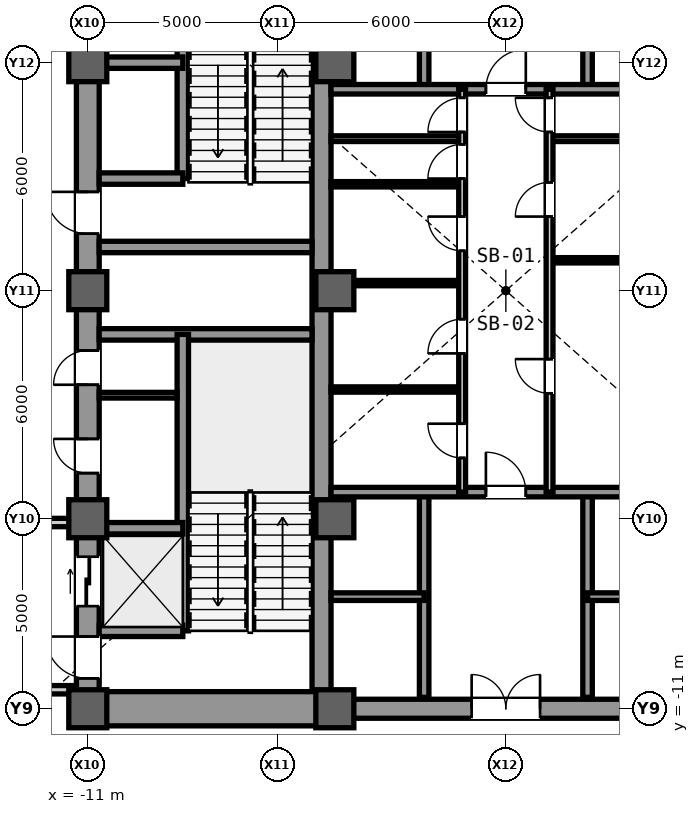
"""IFC4 building model, lengths in metres.
Left out: names, types, materials, properties, quantities, classifications, styles, units other than length and angle.
Written with IfcOpenShell. Run it as: python <this file> out.ifc"""

import sys

from ifc_helpers import new_model, si_unit, direction, frame, frame_2d, origin, origin_2d, place, context, subcontext, project, spatial, rectangle, extrude, source, transform, mapped, element, fill, save


model = new_model("IFC4")
c1 = context("Model", 3, precision=1e-05, world=origin(), true_north=direction((0.0, 1.0)))
c2 = subcontext(c1, "Body", "Model", "MODEL_VIEW")
j1 = project(units=[si_unit("LENGTHUNIT", "METRE"), si_unit("PLANEANGLEUNIT", "RADIAN")], contexts=[c1])
p1 = place(None, origin())
s1 = spatial("IfcSite", under=j1, at=p1, CompositionType="ELEMENT")
p2 = place(p1, origin())
s2 = spatial("IfcBuilding", under=s1, at=p2, CompositionType="ELEMENT")
p3 = place(p2, frame((0.0, 0.0, -9.6)))
s3 = spatial("IfcBuildingStorey", under=s2, at=p3, CompositionType="ELEMENT", Elevation=-9.6)
m1 = source(origin(), c2, "Body", "SweptSolid", [
    extrude(rectangle(XDim=22.0, YDim=0.6, at=frame_2d((11.0, 0.0))), origin(), (0.0, 0.0, 1.0), 4.48),
])
p4 = place(p3, frame((-11.0, -11.0, 0.0), z_axis=(0.0, 0.0, 1.0), x_axis=(0.0, 1.0, 0.0)))
e1 = element("IfcWall", 1, at=p4, inside=s3, PredefinedType="SHEAR", context=c2, shape_type="MappedRepresentation", body=[
    mapped(m1, transform((0.0, 0.0, 0.0), scale=1.0)),
])
m2 = source(origin(), c2, "Body", "SweptSolid", [
    extrude(rectangle(XDim=1.1, YDim=2.2, at=frame_2d((0.55, 1.1))), frame((0.0, 0.31, 0.0), z_axis=(0.0, -1.0, 0.0), x_axis=(1.0, 0.0, 0.0)), (0.0, 0.0, 1.0), 0.62),
])
p5 = place(p4, frame((0.8, 0.0, 0.0)))
e2 = element("IfcOpeningElement", 2, at=p5, cuts=e1, PredefinedType="OPENING", context=c2, shape_type="MappedRepresentation", body=[
    mapped(m2, transform((0.0, 0.0, 0.0), scale=1.0)),
])
p6 = place(p4, frame((12.5, 0.0, 0.0)))
e3 = element("IfcOpeningElement", 3, at=p6, cuts=e1, PredefinedType="OPENING", context=c2, shape_type="MappedRepresentation", body=[
    mapped(m2, transform((0.0, 0.0, 0.0), scale=1.0)),
])
m3 = source(origin(), c2, "Body", "SweptSolid", [
    extrude(rectangle(XDim=0.9, YDim=2.15, at=frame_2d((0.45, 1.075))), frame((0.0, 0.31, 0.0), z_axis=(0.0, -1.0, 0.0), x_axis=(1.0, 0.0, 0.0)), (0.0, 0.0, 1.0), 0.62),
])
p7 = place(p4, frame((6.2, 0.0, 0.0)))
e4 = element("IfcOpeningElement", 4, at=p7, cuts=e1, PredefinedType="OPENING", context=c2, shape_type="MappedRepresentation", body=[
    mapped(m3, transform((0.0, 0.0, 0.0), scale=1.0)),
])
p8 = place(p4, frame((8.525, 0.0, 0.0)))
e5 = element("IfcOpeningElement", 5, at=p8, cuts=e1, PredefinedType="OPENING", context=c2, shape_type="MappedRepresentation", body=[
    mapped(m3, transform((0.0, 0.0, 0.0), scale=1.0)),
])
m4 = source(origin(), c2, "Body", "SweptSolid", [
    extrude(rectangle(XDim=1.3, YDim=2.3, at=frame_2d((0.65, 1.15))), frame((0.0, 0.31, 0.0), z_axis=(0.0, -1.0, 0.0), x_axis=(1.0, 0.0, 0.0)), (0.0, 0.0, 1.0), 0.62),
])
p9 = place(p4, frame((2.7, 0.0, 0.0)))
e6 = element("IfcOpeningElement", 6, at=p9, cuts=e1, PredefinedType="OPENING", context=c2, shape_type="MappedRepresentation", body=[
    mapped(m4, transform((0.0, 0.0, 0.0), scale=1.0)),
])
m5 = source(origin(), c2, "Body", "SweptSolid", [
    extrude(rectangle(XDim=21.4, YDim=0.5, at=frame_2d((10.7, 0.0))), origin(), (0.0, 0.0, 1.0), 4.48),
])
p10 = place(p3, frame((-4.85, -10.7, 0.0), z_axis=(0.0, 0.0, 1.0), x_axis=(0.0, 1.0, 0.0)))
e7 = element("IfcWall", 7, at=p10, inside=s3, PredefinedType="SHEAR", context=c2, shape_type="MappedRepresentation", body=[
    mapped(m5, transform((0.0, 0.0, 0.0), scale=1.0)),
])
m6 = source(origin(), c2, "Body", "SweptSolid", [
    extrude(rectangle(XDim=5.85, YDim=0.9, at=frame_2d((2.925, 0.0))), origin(), (0.0, 0.0, 1.0), 4.48),
])
p11 = place(p3, frame((-10.7, -11.0, 0.0), z_axis=(0.0, 0.0, 1.0), x_axis=(1.0, 0.0, 0.0)))
e8 = element("IfcWall", 8, at=p11, inside=s3, PredefinedType="SHEAR", context=c2, shape_type="MappedRepresentation", body=[
    mapped(m6, transform((0.0, 0.0, 0.0), scale=1.0)),
])
m7 = source(origin(), c2, "Body", "SweptSolid", [
    extrude(rectangle(XDim=5.6, YDim=0.3, at=frame_2d((2.8, 0.0))), origin(), (0.0, 0.0, 1.0), 4.48),
])
for number, where, z_axis, x_axis in (
    (9, (-10.7, -1.15, 0.0), (0.0, 0.0, 1.0), (1.0, 0.0, 0.0)),
    (10, (-10.7, 1.15, 0.0), (0.0, 0.0, 1.0), (1.0, 0.0, 0.0)),
):
    element("IfcWall", number, at=place(p3, frame(where, z_axis=z_axis, x_axis=x_axis)), inside=s3, PredefinedType="SHEAR", context=c2, shape_type="MappedRepresentation", body=[
        mapped(m7, transform((0.0, 0.0, 0.0), scale=1.0)),
    ])
m8 = source(origin(), c2, "Body", "SweptSolid", [
    extrude(rectangle(XDim=9.2, YDim=0.5, at=frame_2d((4.6, 0.0))), origin(), (0.0, 0.0, 1.0), 4.48),
])
p12 = place(p3, frame((-4.6, -11.0, 0.0), z_axis=(0.0, 0.0, 1.0), x_axis=(1.0, 0.0, 0.0)))
e11 = element("IfcWall", 11, at=p12, inside=s3, PredefinedType="SHEAR", context=c2, shape_type="MappedRepresentation", body=[
    mapped(m8, transform((0.0, 0.0, 0.0), scale=1.0)),
])
m9 = source(origin(), c2, "Body", "SweptSolid", [
    extrude(rectangle(XDim=1.8, YDim=2.25, at=frame_2d((0.9, 1.125))), frame((0.0, 0.26, 0.0), z_axis=(0.0, -1.0, 0.0), x_axis=(1.0, 0.0, 0.0)), (0.0, 0.0, 1.0), 0.52),
])
p13 = place(p12, frame((3.7, 0.0, 0.0)))
e12 = element("IfcOpeningElement", 12, at=p13, cuts=e11, PredefinedType="OPENING", context=c2, shape_type="MappedRepresentation", body=[
    mapped(m9, transform((0.0, 0.0, 0.0), scale=1.0)),
])
m10 = source(origin(), c2, "Body", "SweptSolid", [
    extrude(rectangle(XDim=1.0, YDim=1.0, at=origin_2d()), origin(), (0.0, 0.0, 1.0), 4.8),
])
for number, where, z_axis, x_axis in (
    (13, (-11.0, -11.0, 0.0), (0.0, 0.0, 1.0), (1.0, 0.0, 0.0)),
    (14, (-11.0, -6.0, 0.0), (0.0, 0.0, 1.0), (1.0, 0.0, 0.0)),
    (15, (-11.0, 0.0, 0.0), (0.0, 0.0, 1.0), (1.0, 0.0, 0.0)),
    (16, (-11.0, 6.0, 0.0), (0.0, 0.0, 1.0), (1.0, 0.0, 0.0)),
    (17, (-4.5, -11.0, 0.0), (0.0, 0.0, 1.0), (1.0, 0.0, 0.0)),
    (18, (-4.5, -6.0, 0.0), (0.0, 0.0, 1.0), (1.0, 0.0, 0.0)),
    (19, (-4.5, 0.0, 0.0), (0.0, 0.0, 1.0), (1.0, 0.0, 0.0)),
    (20, (-4.5, 6.0, 0.0), (0.0, 0.0, 1.0), (1.0, 0.0, 0.0)),
):
    element("IfcColumn", number, at=place(p3, frame(where, z_axis=z_axis, x_axis=x_axis)), inside=s3, PredefinedType="COLUMN", context=c2, shape_type="MappedRepresentation", body=[
        mapped(m10, transform((0.0, 0.0, 0.0), scale=1.0)),
    ])
m11 = source(origin(), c2, "Body", "SweptSolid", [
    extrude(rectangle(XDim=7.8, YDim=0.3, at=frame_2d((3.9, 0.0))), origin(), (0.0, 0.0, 1.0), 4.48),
])
p14 = place(p3, frame((-8.5, -8.95, 0.0), z_axis=(0.0, 0.0, 1.0), x_axis=(0.0, 1.0, 0.0)))
e21 = element("IfcWall", 21, at=p14, inside=s3, PredefinedType="SHEAR", context=c2, shape_type="MappedRepresentation", body=[
    mapped(m11, transform((0.0, 0.0, 0.0), scale=1.0)),
])
m12 = source(origin(), c2, "Body", "SweptSolid", [
    extrude(rectangle(XDim=2.2, YDim=0.3, at=frame_2d((1.1, 0.0))), origin(), (0.0, 0.0, 1.0), 4.48),
])
for number, where, z_axis, x_axis in (
    (22, (-10.7, -8.95, 0.0), (0.0, 0.0, 1.0), (1.0, 0.0, 0.0)),
    (23, (-10.7, -6.25, 0.0), (0.0, 0.0, 1.0), (1.0, 0.0, 0.0)),
):
    element("IfcWall", number, at=place(p3, frame(where, z_axis=z_axis, x_axis=x_axis)), inside=s3, PredefinedType="SHEAR", context=c2, shape_type="MappedRepresentation", body=[
        mapped(m12, transform((0.0, 0.0, 0.0), scale=1.0)),
    ])
m13 = source(origin(), c2, "Body", "SweptSolid", [
    extrude(rectangle(XDim=7.75, YDim=0.3, at=frame_2d((3.875, 0.0))), origin(), (0.0, 0.0, 1.0), 4.48),
])
p15 = place(p3, frame((-8.5, 2.95, 0.0), z_axis=(0.0, 0.0, 1.0), x_axis=(0.0, 1.0, 0.0)))
e24 = element("IfcWall", 24, at=p15, inside=s3, PredefinedType="SHEAR", context=c2, shape_type="MappedRepresentation", body=[
    mapped(m13, transform((0.0, 0.0, 0.0), scale=1.0)),
])
for number, where, z_axis, x_axis in (
    (25, (-10.7, 2.95, 0.0), (0.0, 0.0, 1.0), (1.0, 0.0, 0.0)),
    (26, (-10.7, 6.0, 0.0), (0.0, 0.0, 1.0), (1.0, 0.0, 0.0)),
):
    element("IfcWall", number, at=place(p3, frame(where, z_axis=z_axis, x_axis=x_axis)), inside=s3, PredefinedType="SHEAR", context=c2, shape_type="MappedRepresentation", body=[
        mapped(m12, transform((0.0, 0.0, 0.0), scale=1.0)),
    ])
m14 = source(origin(), c2, "Body", "SweptSolid", [
    extrude(rectangle(XDim=2.05, YDim=0.15, at=frame_2d((1.025, 0.0))), origin(), (0.0, 0.0, 1.0), 4.48),
])
p16 = place(p3, frame((-10.7, -2.75, 0.0), z_axis=(0.0, 0.0, 1.0), x_axis=(1.0, 0.0, 0.0)))
e27 = element("IfcWall", 27, at=p16, inside=s3, PredefinedType="PARTITIONING", context=c2, shape_type="MappedRepresentation", body=[
    mapped(m14, transform((0.0, 0.0, 0.0), scale=1.0)),
])
m15 = source(origin(), c2, "Body", "SweptSolid", [
    extrude(rectangle(XDim=4.05, YDim=0.22, at=frame_2d((2.025, 0.0))), origin(), (0.0, 0.0, 1.0), 4.48),
])
for number, where, z_axis, x_axis in (
    (28, (-15.35, -10.5, 0.0), (0.0, 0.0, 1.0), (1.0, 0.0, 0.0)),
    (29, (-15.35, -6.1, 0.0), (0.0, 0.0, 1.0), (1.0, 0.0, 0.0)),
):
    element("IfcWall", number, at=place(p3, frame(where, z_axis=z_axis, x_axis=x_axis)), inside=s3, PredefinedType="PARTITIONING", context=c2, shape_type="MappedRepresentation", body=[
        mapped(m15, transform((0.0, 0.0, 0.0), scale=1.0)),
    ])
m16 = source(origin(), c2, "Body", "SweptSolid", [
    extrude(rectangle(XDim=3.45, YDim=0.15, at=frame_2d((1.725, 0.0))), origin(), (0.0, 0.0, 1.0), 4.48),
])
for number, where, z_axis, x_axis in (
    (30, (-4.6, 4.0, 0.0), (0.0, 0.0, 1.0), (1.0, 0.0, 0.0)),
    (31, (1.15, 4.0, 0.0), (0.0, 0.0, 1.0), (1.0, 0.0, 0.0)),
):
    element("IfcWall", number, at=place(p3, frame(where, z_axis=z_axis, x_axis=x_axis)), inside=s3, PredefinedType="PARTITIONING", context=c2, shape_type="MappedRepresentation", body=[
        mapped(m16, transform((0.0, 0.0, 0.0), scale=1.0)),
    ])
m17 = source(origin(), c2, "Body", "SweptSolid", [
    extrude(rectangle(XDim=5.4, YDim=0.25, at=frame_2d((2.7, 0.0))), origin(), (0.0, 0.0, 1.0), 4.48),
])
for number, where, z_axis, x_axis in (
    (32, (-2.15, -10.7, 0.0), (0.0, 0.0, 1.0), (0.0, 1.0, 0.0)),
    (33, (2.15, -10.7, 0.0), (0.0, 0.0, 1.0), (0.0, 1.0, 0.0)),
):
    element("IfcWall", number, at=place(p3, frame(where, z_axis=z_axis, x_axis=x_axis)), inside=s3, PredefinedType="SHEAR", context=c2, shape_type="MappedRepresentation", body=[
        mapped(m17, transform((0.0, 0.0, 0.0), scale=1.0)),
    ])
m18 = source(origin(), c2, "Body", "SweptSolid", [
    extrude(rectangle(XDim=2.45, YDim=0.2, at=frame_2d((1.225, 0.0))), origin(), (0.0, 0.0, 1.0), 4.48),
])
for number, where, z_axis, x_axis in (
    (34, (-4.6, -8.05, 0.0), (0.0, 0.0, 1.0), (1.0, 0.0, 0.0)),
    (35, (2.15, -8.05, 0.0), (0.0, 0.0, 1.0), (1.0, 0.0, 0.0)),
):
    element("IfcWall", number, at=place(p3, frame(where, z_axis=z_axis, x_axis=x_axis)), inside=s3, PredefinedType="SHEAR", context=c2, shape_type="MappedRepresentation", body=[
        mapped(m18, transform((0.0, 0.0, 0.0), scale=1.0)),
    ])
m19 = source(origin(), c2, "Body", "SweptSolid", [
    extrude(rectangle(XDim=9.2, YDim=0.25, at=frame_2d((4.6, 0.0))), origin(), (0.0, 0.0, 1.0), 4.48),
])
p17 = place(p3, frame((-4.6, -5.3, 0.0), z_axis=(0.0, 0.0, 1.0), x_axis=(1.0, 0.0, 0.0)))
e36 = element("IfcWall", 36, at=p17, inside=s3, PredefinedType="SHEAR", context=c2, shape_type="MappedRepresentation", body=[
    mapped(m19, transform((0.0, 0.0, 0.0), scale=1.0)),
])
m20 = source(origin(), c2, "Body", "SweptSolid", [
    extrude(rectangle(XDim=1.05, YDim=2.2, at=frame_2d((0.525, 1.1))), frame((0.0, 0.135, 0.0), z_axis=(0.0, -1.0, 0.0), x_axis=(1.0, 0.0, 0.0)), (0.0, 0.0, 1.0), 0.27),
])
p18 = place(p17, frame((4.075, 0.0, 0.0)))
e37 = element("IfcOpeningElement", 37, at=p18, cuts=e36, PredefinedType="OPENING", context=c2, shape_type="MappedRepresentation", body=[
    mapped(m20, transform((0.0, 0.0, 0.0), scale=1.0)),
])
for number, where, z_axis, x_axis in (
    (38, (-2.15, 5.3, 0.0), (0.0, 0.0, 1.0), (0.0, 1.0, 0.0)),
    (39, (2.15, 5.3, 0.0), (0.0, 0.0, 1.0), (0.0, 1.0, 0.0)),
):
    element("IfcWall", number, at=place(p3, frame(where, z_axis=z_axis, x_axis=x_axis)), inside=s3, PredefinedType="SHEAR", context=c2, shape_type="MappedRepresentation", body=[
        mapped(m17, transform((0.0, 0.0, 0.0), scale=1.0)),
    ])
p19 = place(p3, frame((-4.6, 5.3, 0.0), z_axis=(0.0, 0.0, 1.0), x_axis=(1.0, 0.0, 0.0)))
e40 = element("IfcWall", 40, at=p19, inside=s3, PredefinedType="SHEAR", context=c2, shape_type="MappedRepresentation", body=[
    mapped(m19, transform((0.0, 0.0, 0.0), scale=1.0)),
])
p20 = place(p19, frame((4.075, 0.0, 0.0)))
e41 = element("IfcOpeningElement", 41, at=p20, cuts=e40, PredefinedType="OPENING", context=c2, shape_type="MappedRepresentation", body=[
    mapped(m20, transform((0.0, 0.0, 0.0), scale=1.0)),
])
m21 = source(origin(), c2, "Body", "SweptSolid", [
    extrude(rectangle(XDim=3.45, YDim=0.14, at=frame_2d((1.725, 0.0))), origin(), (0.0, 0.0, 1.0), 4.48),
])
p21 = place(p3, frame((-4.6, -2.6, 0.0), z_axis=(0.0, 0.0, 1.0), x_axis=(1.0, 0.0, 0.0)))
e42 = element("IfcWall", 42, at=p21, inside=s3, PredefinedType="PARTITIONING", context=c2, shape_type="MappedRepresentation", body=[
    mapped(m21, transform((0.0, 0.0, 0.0), scale=1.0)),
])
m22 = source(origin(), c2, "Body", "SweptSolid", [
    extrude(rectangle(XDim=3.45, YDim=0.14, at=frame_2d((1.725, 0.0))), origin(), (0.0, 0.0, 1.0), 3.785),
])
p22 = place(p3, frame((-4.6, 0.2, 0.0), z_axis=(0.0, 0.0, 1.0), x_axis=(1.0, 0.0, 0.0)))
e43 = element("IfcWall", 43, at=p22, inside=s3, PredefinedType="PARTITIONING", context=c2, shape_type="MappedRepresentation", body=[
    mapped(m22, transform((0.0, 0.0, 0.0), scale=1.0)),
])
p23 = place(p3, frame((-4.6, 2.8, 0.0), z_axis=(0.0, 0.0, 1.0), x_axis=(1.0, 0.0, 0.0)))
e44 = element("IfcWall", 44, at=p23, inside=s3, PredefinedType="PARTITIONING", context=c2, shape_type="MappedRepresentation", body=[
    mapped(m21, transform((0.0, 0.0, 0.0), scale=1.0)),
])
m23 = source(origin(), c2, "Body", "SweptSolid", [
    extrude(rectangle(XDim=10.6, YDim=0.18, at=frame_2d((5.3, 0.0))), origin(), (0.0, 0.0, 1.0), 4.48),
])
p24 = place(p3, frame((-1.15, -5.3, 0.0), z_axis=(0.0, 0.0, 1.0), x_axis=(0.0, 1.0, 0.0)))
e45 = element("IfcWall", 45, at=p24, inside=s3, PredefinedType="PARTITIONING", context=c2, shape_type="MappedRepresentation", body=[
    mapped(m23, transform((0.0, 0.0, 0.0), scale=1.0)),
])
m24 = source(origin(), c2, "Body", "SweptSolid", [
    extrude(rectangle(XDim=0.9, YDim=2.15, at=frame_2d((0.45, 1.075))), frame((0.0, 0.1, 0.0), z_axis=(0.0, -1.0, 0.0), x_axis=(1.0, 0.0, 0.0)), (0.0, 0.0, 1.0), 0.2),
])
p25 = place(p24, frame((0.9, 0.0, 0.0)))
e46 = element("IfcOpeningElement", 46, at=p25, cuts=e45, PredefinedType="OPENING", context=c2, shape_type="MappedRepresentation", body=[
    mapped(m24, transform((0.0, 0.0, 0.0), scale=1.0)),
])
p26 = place(p24, frame((3.65, 0.0, 0.0)))
e47 = element("IfcOpeningElement", 47, at=p26, cuts=e45, PredefinedType="OPENING", context=c2, shape_type="MappedRepresentation", body=[
    mapped(m24, transform((0.0, 0.0, 0.0), scale=1.0)),
])
p27 = place(p24, frame((6.35, 0.0, 0.0)))
e48 = element("IfcOpeningElement", 48, at=p27, cuts=e45, PredefinedType="OPENING", context=c2, shape_type="MappedRepresentation", body=[
    mapped(m24, transform((0.0, 0.0, 0.0), scale=1.0)),
])
p28 = place(p24, frame((8.25, 0.0, 0.0)))
e49 = element("IfcOpeningElement", 49, at=p28, cuts=e45, PredefinedType="OPENING", context=c2, shape_type="MappedRepresentation", body=[
    mapped(m24, transform((0.0, 0.0, 0.0), scale=1.0)),
])
p29 = place(p24, frame((9.475, 0.0, 0.0)))
e50 = element("IfcOpeningElement", 50, at=p29, cuts=e45, PredefinedType="OPENING", context=c2, shape_type="MappedRepresentation", body=[
    mapped(m24, transform((0.0, 0.0, 0.0), scale=1.0)),
])
p30 = place(p3, frame((1.15, 0.8, 0.0), z_axis=(0.0, 0.0, 1.0), x_axis=(1.0, 0.0, 0.0)))
e51 = element("IfcWall", 51, at=p30, inside=s3, PredefinedType="PARTITIONING", context=c2, shape_type="MappedRepresentation", body=[
    mapped(m21, transform((0.0, 0.0, 0.0), scale=1.0)),
])
p31 = place(p3, frame((1.15, -5.3, 0.0), z_axis=(0.0, 0.0, 1.0), x_axis=(0.0, 1.0, 0.0)))
e52 = element("IfcWall", 52, at=p31, inside=s3, PredefinedType="PARTITIONING", context=c2, shape_type="MappedRepresentation", body=[
    mapped(m23, transform((0.0, 0.0, 0.0), scale=1.0)),
])
p32 = place(p31, frame((2.6, 0.0, 0.0)))
e53 = element("IfcOpeningElement", 53, at=p32, cuts=e52, PredefinedType="OPENING", context=c2, shape_type="MappedRepresentation", body=[
    mapped(m24, transform((0.0, 0.0, 0.0), scale=1.0)),
])
p33 = place(p31, frame((7.25, 0.0, 0.0)))
e54 = element("IfcOpeningElement", 54, at=p33, cuts=e52, PredefinedType="OPENING", context=c2, shape_type="MappedRepresentation", body=[
    mapped(m24, transform((0.0, 0.0, 0.0), scale=1.0)),
])
p34 = place(p31, frame((9.475, 0.0, 0.0)))
e55 = element("IfcOpeningElement", 55, at=p34, cuts=e52, PredefinedType="OPENING", context=c2, shape_type="MappedRepresentation", body=[
    mapped(m24, transform((0.0, 0.0, 0.0), scale=1.0)),
])
m25 = source(origin(), c2, "Body", "SweptSolid", [
    extrude(rectangle(XDim=1.1, YDim=2.2, at=frame_2d((0.55, 1.1))), frame((0.0, 0.025, 0.0), z_axis=(0.0, -1.0, 0.0), x_axis=(1.0, 0.0, 0.0)), (0.0, 0.0, 1.0), 0.05),
])
p35 = place(p5, origin())
e56 = element("IfcDoor", 56, at=p35, inside=s3, OperationType="SINGLE_SWING_RIGHT", PredefinedType="DOOR", context=c2, shape_type="MappedRepresentation", body=[
    mapped(m25, transform((0.0, 0.0, 0.0), scale=1.0)),
])
fill(e2, e56)
p36 = place(p6, origin())
e57 = element("IfcDoor", 57, at=p36, inside=s3, OperationType="SINGLE_SWING_RIGHT", PredefinedType="DOOR", context=c2, shape_type="MappedRepresentation", body=[
    mapped(m25, transform((0.0, 0.0, 0.0), scale=1.0)),
])
fill(e3, e57)
m26 = source(origin(), c2, "Body", "SweptSolid", [
    extrude(rectangle(XDim=0.9, YDim=2.15, at=frame_2d((0.45, 1.075))), frame((0.0, 0.025, 0.0), z_axis=(0.0, -1.0, 0.0), x_axis=(1.0, 0.0, 0.0)), (0.0, 0.0, 1.0), 0.05),
])
p37 = place(p7, origin())
e58 = element("IfcDoor", 58, at=p37, inside=s3, OperationType="SINGLE_SWING_RIGHT", PredefinedType="DOOR", context=c2, shape_type="MappedRepresentation", body=[
    mapped(m26, transform((0.0, 0.0, 0.0), scale=1.0)),
])
fill(e4, e58)
p38 = place(p8, origin())
e59 = element("IfcDoor", 59, at=p38, inside=s3, OperationType="SINGLE_SWING_LEFT", PredefinedType="DOOR", context=c2, shape_type="MappedRepresentation", body=[
    mapped(m26, transform((0.0, 0.0, 0.0), scale=1.0)),
])
fill(e5, e59)
m27 = source(origin(), c2, "Body", "SweptSolid", [
    extrude(rectangle(XDim=1.05, YDim=2.2, at=frame_2d((0.525, 1.1))), frame((0.0, 0.025, 0.0), z_axis=(0.0, -1.0, 0.0), x_axis=(1.0, 0.0, 0.0)), (0.0, 0.0, 1.0), 0.05),
])
p39 = place(p18, origin())
e60 = element("IfcDoor", 60, at=p39, inside=s3, OperationType="SINGLE_SWING_LEFT", PredefinedType="DOOR", context=c2, shape_type="MappedRepresentation", body=[
    mapped(m27, transform((0.0, 0.0, 0.0), scale=1.0)),
])
fill(e37, e60)
m28 = source(origin(), c2, "Body", "SweptSolid", [
    extrude(rectangle(XDim=1.8, YDim=2.25, at=frame_2d((0.9, 1.125))), frame((0.0, 0.025, 0.0), z_axis=(0.0, -1.0, 0.0), x_axis=(1.0, 0.0, 0.0)), (0.0, 0.0, 1.0), 0.05),
])
p40 = place(p13, origin())
e61 = element("IfcDoor", 61, at=p40, inside=s3, OperationType="SINGLE_SWING_LEFT", PredefinedType="DOOR", context=c2, shape_type="MappedRepresentation", body=[
    mapped(m28, transform((0.0, 0.0, 0.0), scale=1.0)),
])
fill(e12, e61)
p41 = place(p20, origin())
e62 = element("IfcDoor", 62, at=p41, inside=s3, OperationType="SINGLE_SWING_RIGHT", PredefinedType="DOOR", context=c2, shape_type="MappedRepresentation", body=[
    mapped(m27, transform((0.0, 0.0, 0.0), scale=1.0)),
])
fill(e41, e62)
p42 = place(p25, origin())
e63 = element("IfcDoor", 63, at=p42, inside=s3, OperationType="SINGLE_SWING_RIGHT", PredefinedType="DOOR", context=c2, shape_type="MappedRepresentation", body=[
    mapped(m26, transform((0.0, 0.0, 0.0), scale=1.0)),
])
fill(e46, e63)
p43 = place(p26, origin())
e64 = element("IfcDoor", 64, at=p43, inside=s3, OperationType="SINGLE_SWING_LEFT", PredefinedType="DOOR", context=c2, shape_type="MappedRepresentation", body=[
    mapped(m26, transform((0.0, 0.0, 0.0), scale=1.0)),
])
fill(e47, e64)
p44 = place(p27, origin())
e65 = element("IfcDoor", 65, at=p44, inside=s3, OperationType="SINGLE_SWING_RIGHT", PredefinedType="DOOR", context=c2, shape_type="MappedRepresentation", body=[
    mapped(m26, transform((0.0, 0.0, 0.0), scale=1.0)),
])
fill(e48, e65)
p45 = place(p28, origin())
e66 = element("IfcDoor", 66, at=p45, inside=s3, OperationType="SINGLE_SWING_LEFT", PredefinedType="DOOR", context=c2, shape_type="MappedRepresentation", body=[
    mapped(m26, transform((0.0, 0.0, 0.0), scale=1.0)),
])
fill(e49, e66)
p46 = place(p32, origin())
e67 = element("IfcDoor", 67, at=p46, inside=s3, OperationType="SINGLE_SWING_RIGHT", PredefinedType="DOOR", context=c2, shape_type="MappedRepresentation", body=[
    mapped(m26, transform((0.0, 0.0, 0.0), scale=1.0)),
])
fill(e53, e67)
p47 = place(p33, origin())
e68 = element("IfcDoor", 68, at=p47, inside=s3, OperationType="SINGLE_SWING_LEFT", PredefinedType="DOOR", context=c2, shape_type="MappedRepresentation", body=[
    mapped(m26, transform((0.0, 0.0, 0.0), scale=1.0)),
])
fill(e54, e68)
p48 = place(p29, origin())
e69 = element("IfcDoor", 69, at=p48, inside=s3, OperationType="SINGLE_SWING_LEFT", PredefinedType="DOOR", context=c2, shape_type="MappedRepresentation", body=[
    mapped(m26, transform((0.0, 0.0, 0.0), scale=1.0)),
])
fill(e50, e69)
p49 = place(p34, origin())
e70 = element("IfcDoor", 70, at=p49, inside=s3, OperationType="SINGLE_SWING_RIGHT", PredefinedType="DOOR", context=c2, shape_type="MappedRepresentation", body=[
    mapped(m26, transform((0.0, 0.0, 0.0), scale=1.0)),
])
fill(e55, e70)
m29 = source(origin(), c2, "Body", "SweptSolid", [
    extrude(rectangle(XDim=1.3, YDim=2.3, at=frame_2d((0.65, 1.15))), frame((0.0, 0.025, 0.0), z_axis=(0.0, -1.0, 0.0), x_axis=(1.0, 0.0, 0.0)), (0.0, 0.0, 1.0), 0.05),
])
p50 = place(p9, origin())
e71 = element("IfcDoor", 71, at=p50, inside=s3, OperationType="SLIDING_TO_LEFT", PredefinedType="DOOR", context=c2, shape_type="MappedRepresentation", body=[
    mapped(m29, transform((0.0, 0.0, 0.0), scale=1.0)),
])
fill(e6, e71)
save(model, sys.argv[1])
